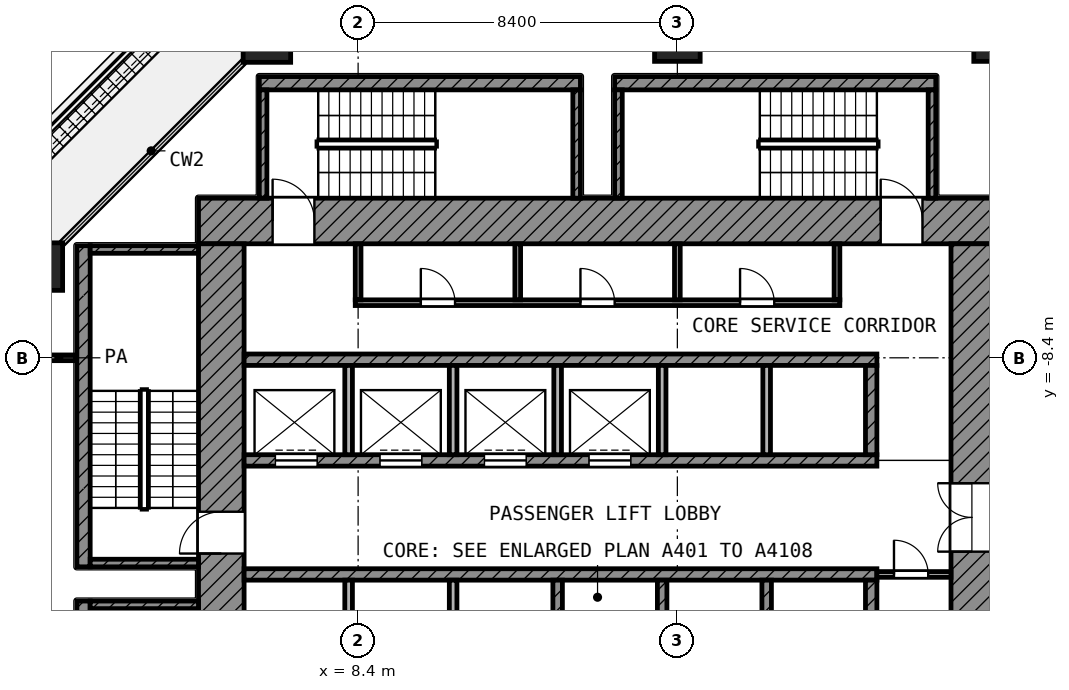
"""IFC4 building model, lengths in metres.
Left out: names, types, materials, properties, quantities, classifications, styles, units other than length and angle.
Written with IfcOpenShell. Run it as: python <this file> out.ifc"""

import sys

from ifc_helpers import new_model, si_unit, direction, frame, frame_2d, origin, origin_2d, place, context, subcontext, project, spatial, rectangle, extrude, element, fill, save


model = new_model("IFC4")
c1 = context("Model", 3, precision=1e-05, world=origin(), true_north=direction((0.0, 1.0)))
c2 = subcontext(c1, "Body", "Model", "MODEL_VIEW")
j1 = project(units=[si_unit("LENGTHUNIT", "METRE"), si_unit("PLANEANGLEUNIT", "RADIAN")], contexts=[c1])
p1 = place(None, origin())
s1 = spatial("IfcSite", under=j1, at=p1, CompositionType="ELEMENT")
p2 = place(p1, origin())
s2 = spatial("IfcBuilding", under=s1, at=p2, CompositionType="ELEMENT")
p3 = place(p2, frame((0.0, 0.0, 39.2)))
s3 = spatial("IfcBuildingStorey", under=s2, at=p3, CompositionType="ELEMENT", Elevation=39.2)
p4 = place(p3, frame((6.0, 0.0, 0.0), z_axis=(0.0, 0.0, 1.0), x_axis=(1.0, 0.0, 0.0)))
e1 = element("IfcColumn", 1, at=p4, inside=s3, PredefinedType="COLUMN", context=c2, shape_type="SweptSolid", body=[
    extrude(rectangle(XDim=1.25, YDim=1.25, at=origin_2d()), origin(), (0.0, 0.0, 1.0), 4.2),
])
for number, where, z_axis, x_axis in (
    (2, (16.8, 0.0, 0.0), (0.0, 0.0, 1.0), (1.0, 0.0, 0.0)),
    (3, (25.2, 0.0, 0.0), (0.0, 0.0, 1.0), (1.0, 0.0, 0.0)),
):
    element("IfcColumn", number, at=place(p3, frame(where, z_axis=z_axis, x_axis=x_axis)), inside=s3, PredefinedType="COLUMN", context=c2, shape_type="SweptSolid", body=[
        extrude(rectangle(XDim=1.2, YDim=1.2, at=origin_2d()), origin(), (0.0, 0.0, 1.0), 4.2),
    ])
p5 = place(p3, frame((0.0, -6.0, 0.0), z_axis=(0.0, 0.0, 1.0), x_axis=(1.0, 0.0, 0.0)))
e4 = element("IfcColumn", 4, at=p5, inside=s3, PredefinedType="COLUMN", context=c2, shape_type="SweptSolid", body=[
    extrude(rectangle(XDim=1.25, YDim=1.25, at=origin_2d()), origin(), (0.0, 0.0, 1.0), 4.2),
])
p6 = place(p3, frame((4.2, -4.8, 0.0), z_axis=(0.0, 0.0, 1.0), x_axis=(1.0, 0.0, 0.0)))
e5 = element("IfcWall", 5, at=p6, inside=s3, PredefinedType="SHEAR", context=c2, shape_type="SweptSolid", body=[
    extrude(rectangle(XDim=20.9, YDim=1.2, at=frame_2d((10.45, 0.0))), origin(), (0.0, 0.0, 1.0), 3.9),
])
p7 = place(p6, frame((1.95, 0.0, 0.0)))
e6 = element("IfcOpeningElement", 6, at=p7, cuts=e5, PredefinedType="OPENING", context=c2, shape_type="SweptSolid", body=[
    extrude(rectangle(XDim=1.1, YDim=2.1, at=frame_2d((0.55, 1.05))), frame((0.0, 0.61, 0.0), z_axis=(0.0, -1.0, 0.0), x_axis=(1.0, 0.0, 0.0)), (0.0, 0.0, 1.0), 1.22),
])
p8 = place(p6, frame((17.95, 0.0, 0.0)))
e7 = element("IfcOpeningElement", 7, at=p8, cuts=e5, PredefinedType="OPENING", context=c2, shape_type="SweptSolid", body=[
    extrude(rectangle(XDim=1.1, YDim=2.1, at=frame_2d((0.55, 1.05))), frame((0.0, 0.61, 0.0), z_axis=(0.0, -1.0, 0.0), x_axis=(1.0, 0.0, 0.0)), (0.0, 0.0, 1.0), 1.22),
])
p9 = place(p3, frame((4.8, -25.1, 0.0), z_axis=(0.0, 0.0, 1.0), x_axis=(0.0, 1.0, 0.0)))
e8 = element("IfcWall", 8, at=p9, inside=s3, PredefinedType="SHEAR", context=c2, shape_type="SweptSolid", body=[
    extrude(rectangle(XDim=19.7, YDim=1.2, at=frame_2d((9.85, 0.0))), origin(), (0.0, 0.0, 1.0), 3.9),
])
p10 = place(p9, frame((11.55, 0.0, 0.0)))
e9 = element("IfcOpeningElement", 9, at=p10, cuts=e8, PredefinedType="OPENING", context=c2, shape_type="SweptSolid", body=[
    extrude(rectangle(XDim=1.1, YDim=2.1, at=frame_2d((0.55, 1.05))), frame((0.0, 0.61, 0.0), z_axis=(0.0, -1.0, 0.0), x_axis=(1.0, 0.0, 0.0)), (0.0, 0.0, 1.0), 1.22),
])
p11 = place(p9, frame((2.25, 0.0, 0.0)))
e10 = element("IfcOpeningElement", 10, at=p11, cuts=e8, PredefinedType="OPENING", context=c2, shape_type="SweptSolid", body=[
    extrude(rectangle(XDim=1.1, YDim=2.1, at=frame_2d((0.55, 1.05))), frame((0.0, 0.61, 0.0), z_axis=(0.0, -1.0, 0.0), x_axis=(1.0, 0.0, 0.0)), (0.0, 0.0, 1.0), 1.22),
])
p12 = place(p3, frame((24.55, -24.0, 0.0), z_axis=(0.0, 0.0, 1.0), x_axis=(0.0, 1.0, 0.0)))
e11 = element("IfcWall", 11, at=p12, inside=s3, PredefinedType="SHEAR", context=c2, shape_type="SweptSolid", body=[
    extrude(rectangle(XDim=18.6, YDim=1.1, at=frame_2d((9.3, 0.0))), origin(), (0.0, 0.0, 1.0), 3.9),
])
p13 = place(p12, frame((10.5, 0.0, 0.0)))
e12 = element("IfcOpeningElement", 12, at=p13, cuts=e11, PredefinedType="OPENING", context=c2, shape_type="SweptSolid", body=[
    extrude(rectangle(XDim=1.8, YDim=2.1, at=frame_2d((0.9, 1.05))), frame((0.0, 0.56, 0.0), z_axis=(0.0, -1.0, 0.0), x_axis=(1.0, 0.0, 0.0)), (0.0, 0.0, 1.0), 1.12),
])
p14 = place(p3, frame((5.4, -8.45, 0.0), z_axis=(0.0, 0.0, 1.0), x_axis=(1.0, 0.0, 0.0)))
e13 = element("IfcWall", 13, at=p14, inside=s3, PredefinedType="SHEAR", context=c2, shape_type="SweptSolid", body=[
    extrude(rectangle(XDim=16.65, YDim=0.3, at=frame_2d((8.325, 0.0))), origin(), (0.0, 0.0, 1.0), 3.9),
])
p15 = place(p3, frame((5.4, -11.1, 0.0), z_axis=(0.0, 0.0, 1.0), x_axis=(1.0, 0.0, 0.0)))
e14 = element("IfcWall", 14, at=p15, inside=s3, PredefinedType="SHEAR", context=c2, shape_type="SweptSolid", body=[
    extrude(rectangle(XDim=16.65, YDim=0.3, at=frame_2d((8.325, 0.0))), origin(), (0.0, 0.0, 1.0), 3.9),
])
p16 = place(p15, frame((0.825, 0.0, 0.0)))
e15 = element("IfcOpeningElement", 15, at=p16, cuts=e14, PredefinedType="OPENING", context=c2, shape_type="SweptSolid", body=[
    extrude(rectangle(XDim=1.1, YDim=2.1, at=frame_2d((0.55, 1.05))), frame((0.0, 0.16, 0.0), z_axis=(0.0, -1.0, 0.0), x_axis=(1.0, 0.0, 0.0)), (0.0, 0.0, 1.0), 0.32),
])
p17 = place(p15, frame((3.575, 0.0, 0.0)))
e16 = element("IfcOpeningElement", 16, at=p17, cuts=e14, PredefinedType="OPENING", context=c2, shape_type="SweptSolid", body=[
    extrude(rectangle(XDim=1.1, YDim=2.1, at=frame_2d((0.55, 1.05))), frame((0.0, 0.16, 0.0), z_axis=(0.0, -1.0, 0.0), x_axis=(1.0, 0.0, 0.0)), (0.0, 0.0, 1.0), 0.32),
])
p18 = place(p15, frame((6.325, 0.0, 0.0)))
e17 = element("IfcOpeningElement", 17, at=p18, cuts=e14, PredefinedType="OPENING", context=c2, shape_type="SweptSolid", body=[
    extrude(rectangle(XDim=1.1, YDim=2.1, at=frame_2d((0.55, 1.05))), frame((0.0, 0.16, 0.0), z_axis=(0.0, -1.0, 0.0), x_axis=(1.0, 0.0, 0.0)), (0.0, 0.0, 1.0), 0.32),
])
p19 = place(p15, frame((9.075, 0.0, 0.0)))
e18 = element("IfcOpeningElement", 18, at=p19, cuts=e14, PredefinedType="OPENING", context=c2, shape_type="SweptSolid", body=[
    extrude(rectangle(XDim=1.1, YDim=2.1, at=frame_2d((0.55, 1.05))), frame((0.0, 0.16, 0.0), z_axis=(0.0, -1.0, 0.0), x_axis=(1.0, 0.0, 0.0)), (0.0, 0.0, 1.0), 0.32),
])
p20 = place(p3, frame((5.4, -14.1, 0.0), z_axis=(0.0, 0.0, 1.0), x_axis=(1.0, 0.0, 0.0)))
e19 = element("IfcWall", 19, at=p20, inside=s3, PredefinedType="SHEAR", context=c2, shape_type="SweptSolid", body=[
    extrude(rectangle(XDim=16.65, YDim=0.3, at=frame_2d((8.325, 0.0))), origin(), (0.0, 0.0, 1.0), 3.9),
])
p21 = place(p3, frame((21.9, -10.95, 0.0), z_axis=(0.0, 0.0, 1.0), x_axis=(0.0, 1.0, 0.0)))
e20 = element("IfcWall", 20, at=p21, inside=s3, PredefinedType="SHEAR", context=c2, shape_type="SweptSolid", body=[
    extrude(rectangle(XDim=2.35, YDim=0.3, at=frame_2d((1.175, 0.0))), origin(), (0.0, 0.0, 1.0), 3.9),
])
p22 = place(p3, frame((21.9, -16.6, 0.0), z_axis=(0.0, 0.0, 1.0), x_axis=(0.0, 1.0, 0.0)))
e21 = element("IfcWall", 21, at=p22, inside=s3, PredefinedType="SHEAR", context=c2, shape_type="SweptSolid", body=[
    extrude(rectangle(XDim=2.35, YDim=0.3, at=frame_2d((1.175, 0.0))), origin(), (0.0, 0.0, 1.0), 3.9),
])
for number, where, z_axis, x_axis in (
    (22, (8.15, -10.95, 0.0), (0.0, 0.0, 1.0), (0.0, 1.0, 0.0)),
    (23, (10.9, -10.95, 0.0), (0.0, 0.0, 1.0), (0.0, 1.0, 0.0)),
    (24, (13.65, -10.95, 0.0), (0.0, 0.0, 1.0), (0.0, 1.0, 0.0)),
    (25, (16.4, -10.95, 0.0), (0.0, 0.0, 1.0), (0.0, 1.0, 0.0)),
    (26, (19.15, -10.95, 0.0), (0.0, 0.0, 1.0), (0.0, 1.0, 0.0)),
):
    element("IfcWall", number, at=place(p3, frame(where, z_axis=z_axis, x_axis=x_axis)), inside=s3, PredefinedType="PARTITIONING", context=c2, shape_type="SweptSolid", body=[
        extrude(rectangle(XDim=2.35, YDim=0.2, at=frame_2d((1.175, 0.0))), origin(), (0.0, 0.0, 1.0), 3.9),
    ])
for number, where, z_axis, x_axis in (
    (27, (8.15, -16.6, 0.0), (0.0, 0.0, 1.0), (0.0, 1.0, 0.0)),
    (28, (10.9, -16.6, 0.0), (0.0, 0.0, 1.0), (0.0, 1.0, 0.0)),
):
    element("IfcWall", number, at=place(p3, frame(where, z_axis=z_axis, x_axis=x_axis)), inside=s3, PredefinedType="PARTITIONING", context=c2, shape_type="SweptSolid", body=[
        extrude(rectangle(XDim=2.35, YDim=0.2, at=frame_2d((1.175, 0.0))), origin(), (0.0, 0.0, 1.0), 3.9),
    ])
for number, where, z_axis, x_axis in (
    (29, (13.65, -16.6, 0.0), (0.0, 0.0, 1.0), (0.0, 1.0, 0.0)),
    (30, (16.4, -16.6, 0.0), (0.0, 0.0, 1.0), (0.0, 1.0, 0.0)),
    (31, (19.15, -16.6, 0.0), (0.0, 0.0, 1.0), (0.0, 1.0, 0.0)),
):
    element("IfcWall", number, at=place(p3, frame(where, z_axis=z_axis, x_axis=x_axis)), inside=s3, PredefinedType="SHEAR", context=c2, shape_type="SweptSolid", body=[
        extrude(rectangle(XDim=2.35, YDim=0.25, at=frame_2d((1.175, 0.0))), origin(), (0.0, 0.0, 1.0), 3.9),
    ])
p23 = place(p3, frame((22.05, -14.1, 0.0), z_axis=(0.0, 0.0, 1.0), x_axis=(1.0, 0.0, 0.0)))
e32 = element("IfcWall", 32, at=p23, inside=s3, PredefinedType="PARTITIONING", context=c2, shape_type="SweptSolid", body=[
    extrude(rectangle(XDim=1.95, YDim=0.15, at=frame_2d((0.975, 0.0))), origin(), (0.0, 0.0, 1.0), 3.9),
])
p24 = place(p23, frame((0.45, 0.0, 0.0)))
e33 = element("IfcOpeningElement", 33, at=p24, cuts=e32, PredefinedType="OPENING", context=c2, shape_type="SweptSolid", body=[
    extrude(rectangle(XDim=0.9, YDim=2.1, at=frame_2d((0.45, 1.05))), frame((0.0, 0.085, 0.0), z_axis=(0.0, -1.0, 0.0), x_axis=(1.0, 0.0, 0.0)), (0.0, 0.0, 1.0), 0.17),
])
p25 = place(p3, frame((8.325, -6.95, 0.0), z_axis=(0.0, 0.0, 1.0), x_axis=(1.0, 0.0, 0.0)))
e34 = element("IfcWall", 34, at=p25, inside=s3, PredefinedType="PARTITIONING", context=c2, shape_type="SweptSolid", body=[
    extrude(rectangle(XDim=12.75, YDim=0.15, at=frame_2d((6.375, 0.0))), origin(), (0.0, 0.0, 1.0), 3.9),
])
p26 = place(p25, frame((1.725, 0.0, 0.0)))
e35 = element("IfcOpeningElement", 35, at=p26, cuts=e34, PredefinedType="OPENING", context=c2, shape_type="SweptSolid", body=[
    extrude(rectangle(XDim=0.9, YDim=2.1, at=frame_2d((0.45, 1.05))), frame((0.0, 0.085, 0.0), z_axis=(0.0, -1.0, 0.0), x_axis=(1.0, 0.0, 0.0)), (0.0, 0.0, 1.0), 0.17),
])
p27 = place(p25, frame((5.925, 0.0, 0.0)))
e36 = element("IfcOpeningElement", 36, at=p27, cuts=e34, PredefinedType="OPENING", context=c2, shape_type="SweptSolid", body=[
    extrude(rectangle(XDim=0.9, YDim=2.1, at=frame_2d((0.45, 1.05))), frame((0.0, 0.085, 0.0), z_axis=(0.0, -1.0, 0.0), x_axis=(1.0, 0.0, 0.0)), (0.0, 0.0, 1.0), 0.17),
])
p28 = place(p25, frame((10.125, 0.0, 0.0)))
e37 = element("IfcOpeningElement", 37, at=p28, cuts=e34, PredefinedType="OPENING", context=c2, shape_type="SweptSolid", body=[
    extrude(rectangle(XDim=0.9, YDim=2.1, at=frame_2d((0.45, 1.05))), frame((0.0, 0.085, 0.0), z_axis=(0.0, -1.0, 0.0), x_axis=(1.0, 0.0, 0.0)), (0.0, 0.0, 1.0), 0.17),
])
for number, where, z_axis, x_axis in (
    (38, (8.4, -6.875, 0.0), (0.0, 0.0, 1.0), (0.0, 1.0, 0.0)),
    (39, (12.6, -6.875, 0.0), (0.0, 0.0, 1.0), (0.0, 1.0, 0.0)),
    (40, (16.8, -6.875, 0.0), (0.0, 0.0, 1.0), (0.0, 1.0, 0.0)),
    (41, (21.0, -6.875, 0.0), (0.0, 0.0, 1.0), (0.0, 1.0, 0.0)),
):
    element("IfcWall", number, at=place(p3, frame(where, z_axis=z_axis, x_axis=x_axis)), inside=s3, PredefinedType="PARTITIONING", context=c2, shape_type="SweptSolid", body=[
        extrude(rectangle(XDim=1.475, YDim=0.15, at=frame_2d((0.738, 0.0))), origin(), (0.0, 0.0, 1.0), 3.9),
    ])
p29 = place(p3, frame((1.175, -13.9, 0.0), z_axis=(0.0, 0.0, 1.0), x_axis=(0.0, 1.0, 0.0)))
e42 = element("IfcWall", 42, at=p29, inside=s3, PredefinedType="SHEAR", context=c2, shape_type="SweptSolid", body=[
    extrude(rectangle(XDim=8.45, YDim=0.35, at=frame_2d((4.225, 0.0))), origin(), (0.0, 0.0, 1.0), 3.9),
])
for number, where, z_axis, x_axis in (
    (43, (1.35, -5.55, 0.0), (0.0, 0.0, 1.0), (1.0, 0.0, 0.0)),
    (44, (1.35, -13.8, 0.0), (0.0, 0.0, 1.0), (1.0, 0.0, 0.0)),
):
    element("IfcWall", number, at=place(p3, frame(where, z_axis=z_axis, x_axis=x_axis)), inside=s3, PredefinedType="SHEAR", context=c2, shape_type="SweptSolid", body=[
        extrude(rectangle(XDim=2.85, YDim=0.2, at=frame_2d((1.425, 0.0))), origin(), (0.0, 0.0, 1.0), 3.9),
    ])
p30 = place(p3, frame((1.175, -23.25, 0.0), z_axis=(0.0, 0.0, 1.0), x_axis=(0.0, 1.0, 0.0)))
e45 = element("IfcWall", 45, at=p30, inside=s3, PredefinedType="SHEAR", context=c2, shape_type="SweptSolid", body=[
    extrude(rectangle(XDim=8.45, YDim=0.35, at=frame_2d((4.225, 0.0))), origin(), (0.0, 0.0, 1.0), 3.9),
])
p31 = place(p3, frame((1.35, -14.9, 0.0), z_axis=(0.0, 0.0, 1.0), x_axis=(1.0, 0.0, 0.0)))
e46 = element("IfcWall", 46, at=p31, inside=s3, PredefinedType="SHEAR", context=c2, shape_type="SweptSolid", body=[
    extrude(rectangle(XDim=2.85, YDim=0.2, at=frame_2d((1.425, 0.0))), origin(), (0.0, 0.0, 1.0), 3.9),
])
p32 = place(p3, frame((5.8, -1.175, 0.0), z_axis=(0.0, 0.0, 1.0), x_axis=(1.0, 0.0, 0.0)))
e47 = element("IfcWall", 47, at=p32, inside=s3, PredefinedType="SHEAR", context=c2, shape_type="SweptSolid", body=[
    extrude(rectangle(XDim=8.45, YDim=0.35, at=frame_2d((4.225, 0.0))), origin(), (0.0, 0.0, 1.0), 3.9),
])
for number, where, z_axis, x_axis in (
    (48, (5.9, -4.2, 0.0), (0.0, 0.0, 1.0), (0.0, 1.0, 0.0)),
    (49, (14.15, -4.2, 0.0), (0.0, 0.0, 1.0), (0.0, 1.0, 0.0)),
):
    element("IfcWall", number, at=place(p3, frame(where, z_axis=z_axis, x_axis=x_axis)), inside=s3, PredefinedType="SHEAR", context=c2, shape_type="SweptSolid", body=[
        extrude(rectangle(XDim=2.85, YDim=0.2, at=frame_2d((1.425, 0.0))), origin(), (0.0, 0.0, 1.0), 3.9),
    ])
p33 = place(p3, frame((15.15, -1.175, 0.0), z_axis=(0.0, 0.0, 1.0), x_axis=(1.0, 0.0, 0.0)))
e50 = element("IfcWall", 50, at=p33, inside=s3, PredefinedType="SHEAR", context=c2, shape_type="SweptSolid", body=[
    extrude(rectangle(XDim=8.45, YDim=0.35, at=frame_2d((4.225, 0.0))), origin(), (0.0, 0.0, 1.0), 3.9),
])
for number, where, z_axis, x_axis in (
    (51, (15.25, -4.2, 0.0), (0.0, 0.0, 1.0), (0.0, 1.0, 0.0)),
    (52, (23.5, -4.2, 0.0), (0.0, 0.0, 1.0), (0.0, 1.0, 0.0)),
):
    element("IfcWall", number, at=place(p3, frame(where, z_axis=z_axis, x_axis=x_axis)), inside=s3, PredefinedType="SHEAR", context=c2, shape_type="SweptSolid", body=[
        extrude(rectangle(XDim=2.85, YDim=0.2, at=frame_2d((1.425, 0.0))), origin(), (0.0, 0.0, 1.0), 3.9),
    ])
p34 = place(p3, frame((0.08, -8.4, 0.0), z_axis=(0.0, 0.0, 1.0), x_axis=(1.0, 0.0, 0.0)))
e53 = element("IfcWall", 53, at=p34, inside=s3, PredefinedType="PARTITIONING", context=c2, shape_type="SweptSolid", body=[
    extrude(rectangle(XDim=0.89, YDim=0.15, at=frame_2d((0.445, 0.0))), origin(), (0.0, 0.0, 1.0), 3.9),
])
p35 = place(p16, origin())
e54 = element("IfcDoor", 54, at=p35, inside=s3, OperationType="DOUBLE_DOOR_SLIDING", PredefinedType="DOOR", context=c2, shape_type="SweptSolid", body=[
    extrude(rectangle(XDim=1.1, YDim=2.1, at=frame_2d((0.55, 1.05))), frame((0.0, 0.025, 0.0), z_axis=(0.0, -1.0, 0.0), x_axis=(1.0, 0.0, 0.0)), (0.0, 0.0, 1.0), 0.05),
])
fill(e15, e54)
p36 = place(p17, origin())
e55 = element("IfcDoor", 55, at=p36, inside=s3, OperationType="DOUBLE_DOOR_SLIDING", PredefinedType="DOOR", context=c2, shape_type="SweptSolid", body=[
    extrude(rectangle(XDim=1.1, YDim=2.1, at=frame_2d((0.55, 1.05))), frame((0.0, 0.025, 0.0), z_axis=(0.0, -1.0, 0.0), x_axis=(1.0, 0.0, 0.0)), (0.0, 0.0, 1.0), 0.05),
])
fill(e16, e55)
p37 = place(p18, origin())
e56 = element("IfcDoor", 56, at=p37, inside=s3, OperationType="DOUBLE_DOOR_SLIDING", PredefinedType="DOOR", context=c2, shape_type="SweptSolid", body=[
    extrude(rectangle(XDim=1.1, YDim=2.1, at=frame_2d((0.55, 1.05))), frame((0.0, 0.025, 0.0), z_axis=(0.0, -1.0, 0.0), x_axis=(1.0, 0.0, 0.0)), (0.0, 0.0, 1.0), 0.05),
])
fill(e17, e56)
p38 = place(p19, origin())
e57 = element("IfcDoor", 57, at=p38, inside=s3, OperationType="DOUBLE_DOOR_SLIDING", PredefinedType="DOOR", context=c2, shape_type="SweptSolid", body=[
    extrude(rectangle(XDim=1.1, YDim=2.1, at=frame_2d((0.55, 1.05))), frame((0.0, 0.025, 0.0), z_axis=(0.0, -1.0, 0.0), x_axis=(1.0, 0.0, 0.0)), (0.0, 0.0, 1.0), 0.05),
])
fill(e18, e57)
p39 = place(p10, origin())
e58 = element("IfcDoor", 58, at=p39, inside=s3, OperationType="SINGLE_SWING_LEFT", PredefinedType="DOOR", context=c2, shape_type="SweptSolid", body=[
    extrude(rectangle(XDim=1.1, YDim=2.1, at=frame_2d((0.55, 1.05))), frame((0.0, 0.025, 0.0), z_axis=(0.0, -1.0, 0.0), x_axis=(1.0, 0.0, 0.0)), (0.0, 0.0, 1.0), 0.05),
])
fill(e9, e58)
p40 = place(p7, origin())
e59 = element("IfcDoor", 59, at=p40, inside=s3, OperationType="SINGLE_SWING_LEFT", PredefinedType="DOOR", context=c2, shape_type="SweptSolid", body=[
    extrude(rectangle(XDim=1.1, YDim=2.1, at=frame_2d((0.55, 1.05))), frame((0.0, 0.025, 0.0), z_axis=(0.0, -1.0, 0.0), x_axis=(1.0, 0.0, 0.0)), (0.0, 0.0, 1.0), 0.05),
])
fill(e6, e59)
p41 = place(p8, origin())
e60 = element("IfcDoor", 60, at=p41, inside=s3, OperationType="SINGLE_SWING_LEFT", PredefinedType="DOOR", context=c2, shape_type="SweptSolid", body=[
    extrude(rectangle(XDim=1.1, YDim=2.1, at=frame_2d((0.55, 1.05))), frame((0.0, 0.025, 0.0), z_axis=(0.0, -1.0, 0.0), x_axis=(1.0, 0.0, 0.0)), (0.0, 0.0, 1.0), 0.05),
])
fill(e7, e60)
p42 = place(p13, origin())
e61 = element("IfcDoor", 61, at=p42, inside=s3, OperationType="DOUBLE_DOOR_SINGLE_SWING", PredefinedType="DOOR", context=c2, shape_type="SweptSolid", body=[
    extrude(rectangle(XDim=1.8, YDim=2.1, at=frame_2d((0.9, 1.05))), frame((0.0, 0.025, 0.0), z_axis=(0.0, -1.0, 0.0), x_axis=(1.0, 0.0, 0.0)), (0.0, 0.0, 1.0), 0.05),
])
fill(e12, e61)
p43 = place(p26, origin())
e62 = element("IfcDoor", 62, at=p43, inside=s3, OperationType="SINGLE_SWING_LEFT", PredefinedType="DOOR", context=c2, shape_type="SweptSolid", body=[
    extrude(rectangle(XDim=0.9, YDim=2.1, at=frame_2d((0.45, 1.05))), frame((0.0, 0.025, 0.0), z_axis=(0.0, -1.0, 0.0), x_axis=(1.0, 0.0, 0.0)), (0.0, 0.0, 1.0), 0.05),
])
fill(e35, e62)
p44 = place(p27, origin())
e63 = element("IfcDoor", 63, at=p44, inside=s3, OperationType="SINGLE_SWING_LEFT", PredefinedType="DOOR", context=c2, shape_type="SweptSolid", body=[
    extrude(rectangle(XDim=0.9, YDim=2.1, at=frame_2d((0.45, 1.05))), frame((0.0, 0.025, 0.0), z_axis=(0.0, -1.0, 0.0), x_axis=(1.0, 0.0, 0.0)), (0.0, 0.0, 1.0), 0.05),
])
fill(e36, e63)
p45 = place(p28, origin())
e64 = element("IfcDoor", 64, at=p45, inside=s3, OperationType="SINGLE_SWING_LEFT", PredefinedType="DOOR", context=c2, shape_type="SweptSolid", body=[
    extrude(rectangle(XDim=0.9, YDim=2.1, at=frame_2d((0.45, 1.05))), frame((0.0, 0.025, 0.0), z_axis=(0.0, -1.0, 0.0), x_axis=(1.0, 0.0, 0.0)), (0.0, 0.0, 1.0), 0.05),
])
fill(e37, e64)
p46 = place(p24, origin())
e65 = element("IfcDoor", 65, at=p46, inside=s3, OperationType="SINGLE_SWING_LEFT", PredefinedType="DOOR", context=c2, shape_type="SweptSolid", body=[
    extrude(rectangle(XDim=0.9, YDim=2.1, at=frame_2d((0.45, 1.05))), frame((0.0, 0.025, 0.0), z_axis=(0.0, -1.0, 0.0), x_axis=(1.0, 0.0, 0.0)), (0.0, 0.0, 1.0), 0.05),
])
fill(e33, e65)
save(model, sys.argv[1])
